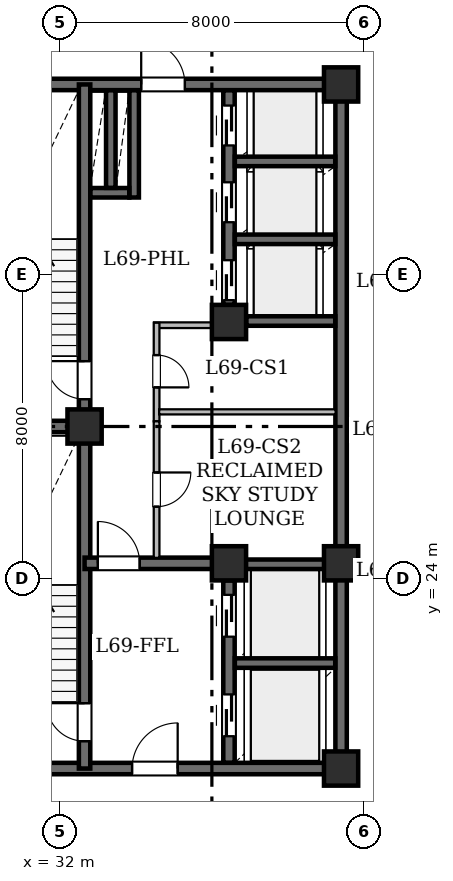
"""IFC4 building model, lengths in metres.
Left out: names, types, materials, properties, quantities, classifications, styles, units other than length and angle.
Written with IfcOpenShell. Run it as: python <this file> out.ifc"""

import sys

from ifc_helpers import new_model, si_unit, direction, frame, frame_2d, origin, origin_2d, place, context, subcontext, project, spatial, rectangle, hollow_rectangle, extrude, element, fill, save


model = new_model("IFC4")
c1 = context("Model", 3, precision=1e-05, world=origin(), true_north=direction((0.0, 1.0)))
c2 = subcontext(c1, "Body", "Model", "MODEL_VIEW")
j1 = project(units=[si_unit("LENGTHUNIT", "METRE"), si_unit("PLANEANGLEUNIT", "RADIAN")], contexts=[c1])
p1 = place(None, origin())
s1 = spatial("IfcSite", under=j1, at=p1, CompositionType="ELEMENT")
p2 = place(p1, origin())
s2 = spatial("IfcBuilding", under=s1, at=p2, CompositionType="ELEMENT")
p3 = place(p2, frame((0.0, 0.0, 269.45)))
s3 = spatial("IfcBuildingStorey", under=s2, at=p3, CompositionType="ELEMENT", Elevation=269.45)
for number, where, z_axis, x_axis in (
    (1, (32.65, 28.0, 0.0), (0.0, 0.0, 1.0), (1.0, 0.0, 0.0)),
    (2, (39.4, 19.0, 0.0), (0.0, 0.0, 1.0), (1.0, 0.0, 0.0)),
    (3, (36.45, 24.4, 0.0), (0.0, 0.0, 1.0), (1.0, 0.0, 0.0)),
    (4, (39.4, 24.4, 0.0), (0.0, 0.0, 1.0), (1.0, 0.0, 0.0)),
    (5, (36.45, 30.75, 0.0), (0.0, 0.0, 1.0), (1.0, 0.0, 0.0)),
    (6, (39.4, 37.0, 0.0), (0.0, 0.0, 1.0), (1.0, 0.0, 0.0)),
):
    element("IfcColumn", number, at=place(p3, frame(where, z_axis=z_axis, x_axis=x_axis)), inside=s3, PredefinedType="COLUMN", context=c2, shape_type="SweptSolid", body=[
        extrude(hollow_rectangle(XDim=0.9, YDim=0.9, WallThickness=0.045, at=origin_2d()), origin(), (0.0, 0.0, 1.0), 4.2),
    ])
p4 = place(p3, frame((29.0, 19.0, 0.0), z_axis=(0.0, 0.0, 1.0), x_axis=(1.0, 0.0, 0.0)))
e7 = element("IfcWall", 7, at=p4, inside=s3, PredefinedType="SHEAR", context=c2, shape_type="SweptSolid", body=[
    extrude(rectangle(XDim=10.4, YDim=0.3, at=frame_2d((5.2, 0.0))), origin(), (0.0, 0.0, 1.0), 3.95),
])
p5 = place(p4, frame((4.9, 0.0, 0.0)))
e8 = element("IfcOpeningElement", 8, at=p5, cuts=e7, PredefinedType="OPENING", context=c2, shape_type="SweptSolid", body=[
    extrude(rectangle(XDim=1.2, YDim=2.15, at=frame_2d((0.6, 1.075))), frame((0.0, 0.16, 0.0), z_axis=(0.0, -1.0, 0.0), x_axis=(1.0, 0.0, 0.0)), (0.0, 0.0, 1.0), 0.32),
])
p6 = place(p3, frame((29.0, 37.0, 0.0), z_axis=(0.0, 0.0, 1.0), x_axis=(1.0, 0.0, 0.0)))
e9 = element("IfcWall", 9, at=p6, inside=s3, PredefinedType="SHEAR", context=c2, shape_type="SweptSolid", body=[
    extrude(rectangle(XDim=10.4, YDim=0.3, at=frame_2d((5.2, 0.0))), origin(), (0.0, 0.0, 1.0), 3.95),
])
p7 = place(p6, frame((5.14, 0.0, 0.0)))
e10 = element("IfcOpeningElement", 10, at=p7, cuts=e9, PredefinedType="OPENING", context=c2, shape_type="SweptSolid", body=[
    extrude(rectangle(XDim=1.15, YDim=2.2, at=frame_2d((0.575, 1.1))), frame((0.0, 0.16, 0.0), z_axis=(0.0, -1.0, 0.0), x_axis=(1.0, 0.0, 0.0)), (0.0, 0.0, 1.0), 0.32),
])
p8 = place(p3, frame((39.4, 19.0, 0.0), z_axis=(0.0, 0.0, 1.0), x_axis=(0.0, 1.0, 0.0)))
e11 = element("IfcWall", 11, at=p8, inside=s3, PredefinedType="SHEAR", context=c2, shape_type="SweptSolid", body=[
    extrude(rectangle(XDim=5.4, YDim=0.3, at=frame_2d((2.7, 0.0))), origin(), (0.0, 0.0, 1.0), 3.95),
])
p9 = place(p3, frame((39.4, 24.4, 0.0), z_axis=(0.0, 0.0, 1.0), x_axis=(0.0, 1.0, 0.0)))
e12 = element("IfcWall", 12, at=p9, inside=s3, PredefinedType="SHEAR", context=c2, shape_type="SweptSolid", body=[
    extrude(rectangle(XDim=12.6, YDim=0.3, at=frame_2d((6.3, 0.0))), origin(), (0.0, 0.0, 1.0), 3.95),
])
p10 = place(p3, frame((32.65, 19.0, 0.0), z_axis=(0.0, 0.0, 1.0), x_axis=(0.0, 1.0, 0.0)))
e13 = element("IfcWall", 13, at=p10, inside=s3, PredefinedType="SHEAR", context=c2, shape_type="SweptSolid", body=[
    extrude(rectangle(XDim=9.0, YDim=0.3, at=frame_2d((4.5, 0.0))), origin(), (0.0, 0.0, 1.0), 3.95),
])
p11 = place(p10, frame((0.72, 0.0, 0.0)))
e14 = element("IfcOpeningElement", 14, at=p11, cuts=e13, PredefinedType="OPENING", context=c2, shape_type="SweptSolid", body=[
    extrude(rectangle(XDim=1.0, YDim=2.15, at=frame_2d((0.5, 1.075))), frame((0.0, 0.16, 0.0), z_axis=(0.0, -1.0, 0.0), x_axis=(1.0, 0.0, 0.0)), (0.0, 0.0, 1.0), 0.32),
])
p12 = place(p3, frame((32.65, 28.0, 0.0), z_axis=(0.0, 0.0, 1.0), x_axis=(0.0, 1.0, 0.0)))
e15 = element("IfcWall", 15, at=p12, inside=s3, PredefinedType="SHEAR", context=c2, shape_type="SweptSolid", body=[
    extrude(rectangle(XDim=9.0, YDim=0.3, at=frame_2d((4.5, 0.0))), origin(), (0.0, 0.0, 1.0), 3.95),
])
p13 = place(p12, frame((0.72, 0.0, 0.0)))
e16 = element("IfcOpeningElement", 16, at=p13, cuts=e15, PredefinedType="OPENING", context=c2, shape_type="SweptSolid", body=[
    extrude(rectangle(XDim=1.0, YDim=2.15, at=frame_2d((0.5, 1.075))), frame((0.0, 0.16, 0.0), z_axis=(0.0, -1.0, 0.0), x_axis=(1.0, 0.0, 0.0)), (0.0, 0.0, 1.0), 0.32),
])
p14 = place(p3, frame((29.0, 28.0, 0.0), z_axis=(0.0, 0.0, 1.0), x_axis=(1.0, 0.0, 0.0)))
e17 = element("IfcWall", 17, at=p14, inside=s3, PredefinedType="SHEAR", context=c2, shape_type="SweptSolid", body=[
    extrude(rectangle(XDim=3.65, YDim=0.3, at=frame_2d((1.825, 0.0))), origin(), (0.0, 0.0, 1.0), 3.95),
])
p15 = place(p3, frame((32.65, 24.4, 0.0), z_axis=(0.0, 0.0, 1.0), x_axis=(1.0, 0.0, 0.0)))
e18 = element("IfcWall", 18, at=p15, inside=s3, PredefinedType="SHEAR", context=c2, shape_type="SweptSolid", body=[
    extrude(rectangle(XDim=3.8, YDim=0.3, at=frame_2d((1.9, 0.0))), origin(), (0.0, 0.0, 1.0), 3.95),
])
p16 = place(p15, frame((0.35, 0.0, 0.0)))
e19 = element("IfcOpeningElement", 19, at=p16, cuts=e18, PredefinedType="OPENING", context=c2, shape_type="SweptSolid", body=[
    extrude(rectangle(XDim=1.1, YDim=2.15, at=frame_2d((0.55, 1.075))), frame((0.0, 0.16, 0.0), z_axis=(0.0, -1.0, 0.0), x_axis=(1.0, 0.0, 0.0)), (0.0, 0.0, 1.0), 0.32),
])
p17 = place(p3, frame((36.45, 19.154, 0.0), z_axis=(0.0, 0.0, 1.0), x_axis=(0.0, 1.0, 0.0)))
e20 = element("IfcWall", 20, at=p17, inside=s3, PredefinedType="SHEAR", context=c2, shape_type="SweptSolid", body=[
    extrude(rectangle(XDim=4.796, YDim=0.3, at=frame_2d((2.398, 0.0))), origin(), (0.0, 0.0, 1.0), 3.95),
])
p18 = place(p17, frame((0.696, 0.0, 0.0)))
e21 = element("IfcOpeningElement", 21, at=p18, cuts=e20, PredefinedType="OPENING", context=c2, shape_type="SweptSolid", body=[
    extrude(rectangle(XDim=1.1, YDim=2.15, at=frame_2d((0.55, 1.075))), frame((0.0, 0.16, 0.0), z_axis=(0.0, -1.0, 0.0), x_axis=(1.0, 0.0, 0.0)), (0.0, 0.0, 1.0), 0.32),
])
p19 = place(p17, frame((3.316, 0.0, 0.0)))
e22 = element("IfcOpeningElement", 22, at=p19, cuts=e20, PredefinedType="OPENING", context=c2, shape_type="SweptSolid", body=[
    extrude(rectangle(XDim=1.1, YDim=2.15, at=frame_2d((0.55, 1.075))), frame((0.0, 0.16, 0.0), z_axis=(0.0, -1.0, 0.0), x_axis=(1.0, 0.0, 0.0)), (0.0, 0.0, 1.0), 0.32),
])
p20 = place(p3, frame((36.45, 31.2, 0.0), z_axis=(0.0, 0.0, 1.0), x_axis=(0.0, 1.0, 0.0)))
e23 = element("IfcWall", 23, at=p20, inside=s3, PredefinedType="SHEAR", context=c2, shape_type="SweptSolid", body=[
    extrude(rectangle(XDim=5.646, YDim=0.3, at=frame_2d((2.823, 0.0))), origin(), (0.0, 0.0, 1.0), 3.95),
])
p21 = place(p20, frame((0.125, 0.0, 0.0)))
e24 = element("IfcOpeningElement", 24, at=p21, cuts=e23, PredefinedType="OPENING", context=c2, shape_type="SweptSolid", body=[
    extrude(rectangle(XDim=1.05, YDim=2.15, at=frame_2d((0.525, 1.075))), frame((0.0, 0.16, 0.0), z_axis=(0.0, -1.0, 0.0), x_axis=(1.0, 0.0, 0.0)), (0.0, 0.0, 1.0), 0.32),
])
p22 = place(p20, frame((2.175, 0.0, 0.0)))
e25 = element("IfcOpeningElement", 25, at=p22, cuts=e23, PredefinedType="OPENING", context=c2, shape_type="SweptSolid", body=[
    extrude(rectangle(XDim=1.05, YDim=2.15, at=frame_2d((0.525, 1.075))), frame((0.0, 0.16, 0.0), z_axis=(0.0, -1.0, 0.0), x_axis=(1.0, 0.0, 0.0)), (0.0, 0.0, 1.0), 0.32),
])
p23 = place(p20, frame((4.195, 0.0, 0.0)))
e26 = element("IfcOpeningElement", 26, at=p23, cuts=e23, PredefinedType="OPENING", context=c2, shape_type="SweptSolid", body=[
    extrude(rectangle(XDim=1.05, YDim=2.15, at=frame_2d((0.525, 1.075))), frame((0.0, 0.16, 0.0), z_axis=(0.0, -1.0, 0.0), x_axis=(1.0, 0.0, 0.0)), (0.0, 0.0, 1.0), 0.32),
])
for number, where, z_axis, x_axis in (
    (27, (36.604, 21.775, 0.0), (0.0, 0.0, 1.0), (1.0, 0.0, 0.0)),
    (28, (36.604, 24.375, 0.0), (0.0, 0.0, 1.0), (1.0, 0.0, 0.0)),
):
    element("IfcWall", number, at=place(p3, frame(where, z_axis=z_axis, x_axis=x_axis)), inside=s3, PredefinedType="SHEAR", context=c2, shape_type="SweptSolid", body=[
        extrude(rectangle(XDim=2.642, YDim=0.25, at=frame_2d((1.321, 0.0))), origin(), (0.0, 0.0, 1.0), 3.95),
    ])
p24 = place(p3, frame((36.904, 30.775, 0.0), z_axis=(0.0, 0.0, 1.0), x_axis=(1.0, 0.0, 0.0)))
e29 = element("IfcWall", 29, at=p24, inside=s3, PredefinedType="SHEAR", context=c2, shape_type="SweptSolid", body=[
    extrude(rectangle(XDim=2.342, YDim=0.25, at=frame_2d((1.171, 0.0))), origin(), (0.0, 0.0, 1.0), 3.95),
])
for number, where, z_axis, x_axis in (
    (30, (36.604, 32.925, 0.0), (0.0, 0.0, 1.0), (1.0, 0.0, 0.0)),
    (31, (36.604, 34.975, 0.0), (0.0, 0.0, 1.0), (1.0, 0.0, 0.0)),
):
    element("IfcWall", number, at=place(p3, frame(where, z_axis=z_axis, x_axis=x_axis)), inside=s3, PredefinedType="SHEAR", context=c2, shape_type="SweptSolid", body=[
        extrude(rectangle(XDim=2.642, YDim=0.25, at=frame_2d((1.321, 0.0))), origin(), (0.0, 0.0, 1.0), 3.95),
    ])
p25 = place(p3, frame((33.955, 34.025, 0.0), z_axis=(0.0, 0.0, 1.0), x_axis=(0.0, 1.0, 0.0)))
e32 = element("IfcWall", 32, at=p25, inside=s3, PredefinedType="SHEAR", context=c2, shape_type="SweptSolid", body=[
    extrude(rectangle(XDim=2.821, YDim=0.25, at=frame_2d((1.411, 0.0))), origin(), (0.0, 0.0, 1.0), 3.95),
])
p26 = place(p3, frame((32.804, 34.15, 0.0), z_axis=(0.0, 0.0, 1.0), x_axis=(1.0, 0.0, 0.0)))
e33 = element("IfcWall", 33, at=p26, inside=s3, PredefinedType="SHEAR", context=c2, shape_type="SweptSolid", body=[
    extrude(rectangle(XDim=1.022, YDim=0.25, at=frame_2d((0.511, 0.0))), origin(), (0.0, 0.0, 1.0), 3.95),
])
p27 = place(p3, frame((33.34, 34.279, 0.0), z_axis=(0.0, 0.0, 1.0), x_axis=(0.0, 1.0, 0.0)))
e34 = element("IfcWall", 34, at=p27, inside=s3, PredefinedType="SHEAR", context=c2, shape_type="SweptSolid", body=[
    extrude(rectangle(XDim=2.567, YDim=0.25, at=frame_2d((1.283, 0.0))), origin(), (0.0, 0.0, 1.0), 3.95),
])
p28 = place(p3, frame((36.3, 30.665, 0.0), z_axis=(0.0, 0.0, 1.0), x_axis=(-1.0, 0.0, 0.0)))
e35 = element("IfcWall", 35, at=p28, inside=s3, PredefinedType="STANDARD", context=c2, shape_type="SweptSolid", body=[
    extrude(rectangle(XDim=1.82, YDim=0.15, at=frame_2d((0.91, 0.0))), origin(), (0.0, 0.0, 1.0), 3.95),
])
p29 = place(p3, frame((34.545, 30.73, 0.0), z_axis=(0.0, 0.0, 1.0), x_axis=(0.0, -1.0, 0.0)))
e36 = element("IfcWall", 36, at=p29, inside=s3, PredefinedType="STANDARD", context=c2, shape_type="SweptSolid", body=[
    extrude(rectangle(XDim=2.594, YDim=0.15, at=frame_2d((1.297, 0.0))), origin(), (0.0, 0.0, 1.0), 3.95),
])
p30 = place(p29, frame((0.851, 0.0, 0.0)))
e37 = element("IfcOpeningElement", 37, at=p30, cuts=e36, PredefinedType="OPENING", context=c2, shape_type="SweptSolid", body=[
    extrude(rectangle(XDim=0.85, YDim=2.1, at=frame_2d((0.425, 1.05))), frame((0.0, 0.085, 0.0), z_axis=(0.0, -1.0, 0.0), x_axis=(1.0, 0.0, 0.0)), (0.0, 0.0, 1.0), 0.17),
])
p31 = place(p3, frame((34.545, 28.136, 0.0), z_axis=(0.0, 0.0, 1.0), x_axis=(0.0, -1.0, 0.0)))
e38 = element("IfcWall", 38, at=p31, inside=s3, PredefinedType="STANDARD", context=c2, shape_type="SweptSolid", body=[
    extrude(rectangle(XDim=3.592, YDim=0.15, at=frame_2d((1.796, 0.0))), origin(), (0.0, 0.0, 1.0), 3.95),
])
p32 = place(p31, frame((1.346, 0.0, 0.0)))
e39 = element("IfcOpeningElement", 39, at=p32, cuts=e38, PredefinedType="OPENING", context=c2, shape_type="SweptSolid", body=[
    extrude(rectangle(XDim=0.9, YDim=2.1, at=frame_2d((0.45, 1.05))), frame((0.0, 0.085, 0.0), z_axis=(0.0, -1.0, 0.0), x_axis=(1.0, 0.0, 0.0)), (0.0, 0.0, 1.0), 0.17),
])
p33 = place(p3, frame((39.256, 28.385, 0.0), z_axis=(0.0, 0.0, 1.0), x_axis=(-1.0, 0.0, 0.0)))
e40 = element("IfcWall", 40, at=p33, inside=s3, PredefinedType="PARTITIONING", context=c2, shape_type="SweptSolid", body=[
    extrude(rectangle(XDim=4.644, YDim=0.135, at=frame_2d((2.322, 0.0))), origin(), (0.0, 0.0, 1.0), 3.95),
])
p34 = place(p11, origin())
e41 = element("IfcDoor", 41, at=p34, inside=s3, OperationType="SINGLE_SWING_RIGHT", PredefinedType="DOOR", context=c2, shape_type="SweptSolid", body=[
    extrude(rectangle(XDim=1.0, YDim=2.15, at=frame_2d((0.5, 1.075))), frame((0.0, 0.025, 0.0), z_axis=(0.0, -1.0, 0.0), x_axis=(1.0, 0.0, 0.0)), (0.0, 0.0, 1.0), 0.05),
])
fill(e14, e41)
p35 = place(p13, origin())
e42 = element("IfcDoor", 42, at=p35, inside=s3, OperationType="SINGLE_SWING_RIGHT", PredefinedType="DOOR", context=c2, shape_type="SweptSolid", body=[
    extrude(rectangle(XDim=1.0, YDim=2.15, at=frame_2d((0.5, 1.075))), frame((0.0, 0.025, 0.0), z_axis=(0.0, -1.0, 0.0), x_axis=(1.0, 0.0, 0.0)), (0.0, 0.0, 1.0), 0.05),
])
fill(e16, e42)
p36 = place(p16, origin())
e43 = element("IfcDoor", 43, at=p36, inside=s3, OperationType="SINGLE_SWING_LEFT", PredefinedType="DOOR", context=c2, shape_type="SweptSolid", body=[
    extrude(rectangle(XDim=1.1, YDim=2.15, at=frame_2d((0.55, 1.075))), frame((0.0, 0.025, 0.0), z_axis=(0.0, -1.0, 0.0), x_axis=(1.0, 0.0, 0.0)), (0.0, 0.0, 1.0), 0.05),
])
fill(e19, e43)
p37 = place(p5, origin())
e44 = element("IfcDoor", 44, at=p37, inside=s3, OperationType="SINGLE_SWING_RIGHT", PredefinedType="DOOR", context=c2, shape_type="SweptSolid", body=[
    extrude(rectangle(XDim=1.2, YDim=2.15, at=frame_2d((0.6, 1.075))), frame((0.0, 0.025, 0.0), z_axis=(0.0, -1.0, 0.0), x_axis=(1.0, 0.0, 0.0)), (0.0, 0.0, 1.0), 0.05),
])
fill(e8, e44)
p38 = place(p7, origin())
e45 = element("IfcDoor", 45, at=p38, inside=s3, OperationType="SINGLE_SWING_LEFT", PredefinedType="DOOR", context=c2, shape_type="SweptSolid", body=[
    extrude(rectangle(XDim=1.15, YDim=2.2, at=frame_2d((0.575, 1.1))), frame((0.0, 0.025, 0.0), z_axis=(0.0, -1.0, 0.0), x_axis=(1.0, 0.0, 0.0)), (0.0, 0.0, 1.0), 0.05),
])
fill(e10, e45)
p39 = place(p18, origin())
e46 = element("IfcDoor", 46, at=p39, inside=s3, OperationType="SLIDING_TO_LEFT", PredefinedType="DOOR", context=c2, shape_type="SweptSolid", body=[
    extrude(rectangle(XDim=1.1, YDim=2.15, at=frame_2d((0.55, 1.075))), frame((0.0, 0.025, 0.0), z_axis=(0.0, -1.0, 0.0), x_axis=(1.0, 0.0, 0.0)), (0.0, 0.0, 1.0), 0.05),
])
fill(e21, e46)
p40 = place(p19, origin())
e47 = element("IfcDoor", 47, at=p40, inside=s3, OperationType="SLIDING_TO_LEFT", PredefinedType="DOOR", context=c2, shape_type="SweptSolid", body=[
    extrude(rectangle(XDim=1.1, YDim=2.15, at=frame_2d((0.55, 1.075))), frame((0.0, 0.025, 0.0), z_axis=(0.0, -1.0, 0.0), x_axis=(1.0, 0.0, 0.0)), (0.0, 0.0, 1.0), 0.05),
])
fill(e22, e47)
p41 = place(p21, origin())
e48 = element("IfcDoor", 48, at=p41, inside=s3, OperationType="SLIDING_TO_LEFT", PredefinedType="DOOR", context=c2, shape_type="SweptSolid", body=[
    extrude(rectangle(XDim=1.05, YDim=2.15, at=frame_2d((0.525, 1.075))), frame((0.0, 0.025, 0.0), z_axis=(0.0, -1.0, 0.0), x_axis=(1.0, 0.0, 0.0)), (0.0, 0.0, 1.0), 0.05),
])
fill(e24, e48)
p42 = place(p22, origin())
e49 = element("IfcDoor", 49, at=p42, inside=s3, OperationType="SLIDING_TO_LEFT", PredefinedType="DOOR", context=c2, shape_type="SweptSolid", body=[
    extrude(rectangle(XDim=1.05, YDim=2.15, at=frame_2d((0.525, 1.075))), frame((0.0, 0.025, 0.0), z_axis=(0.0, -1.0, 0.0), x_axis=(1.0, 0.0, 0.0)), (0.0, 0.0, 1.0), 0.05),
])
fill(e25, e49)
p43 = place(p23, origin())
e50 = element("IfcDoor", 50, at=p43, inside=s3, OperationType="SLIDING_TO_LEFT", PredefinedType="DOOR", context=c2, shape_type="SweptSolid", body=[
    extrude(rectangle(XDim=1.05, YDim=2.15, at=frame_2d((0.525, 1.075))), frame((0.0, 0.025, 0.0), z_axis=(0.0, -1.0, 0.0), x_axis=(1.0, 0.0, 0.0)), (0.0, 0.0, 1.0), 0.05),
])
fill(e26, e50)
p44 = place(p30, origin())
e51 = element("IfcDoor", 51, at=p44, inside=s3, OperationType="SINGLE_SWING_RIGHT", PredefinedType="DOOR", context=c2, shape_type="SweptSolid", body=[
    extrude(rectangle(XDim=0.85, YDim=2.1, at=frame_2d((0.425, 1.05))), frame((0.0, 0.025, 0.0), z_axis=(0.0, -1.0, 0.0), x_axis=(1.0, 0.0, 0.0)), (0.0, 0.0, 1.0), 0.05),
])
fill(e37, e51)
p45 = place(p32, origin())
e52 = element("IfcDoor", 52, at=p45, inside=s3, OperationType="SINGLE_SWING_LEFT", PredefinedType="DOOR", context=c2, shape_type="SweptSolid", body=[
    extrude(rectangle(XDim=0.9, YDim=2.1, at=frame_2d((0.45, 1.05))), frame((0.0, 0.025, 0.0), z_axis=(0.0, -1.0, 0.0), x_axis=(1.0, 0.0, 0.0)), (0.0, 0.0, 1.0), 0.05),
])
fill(e39, e52)
save(model, sys.argv[1])
